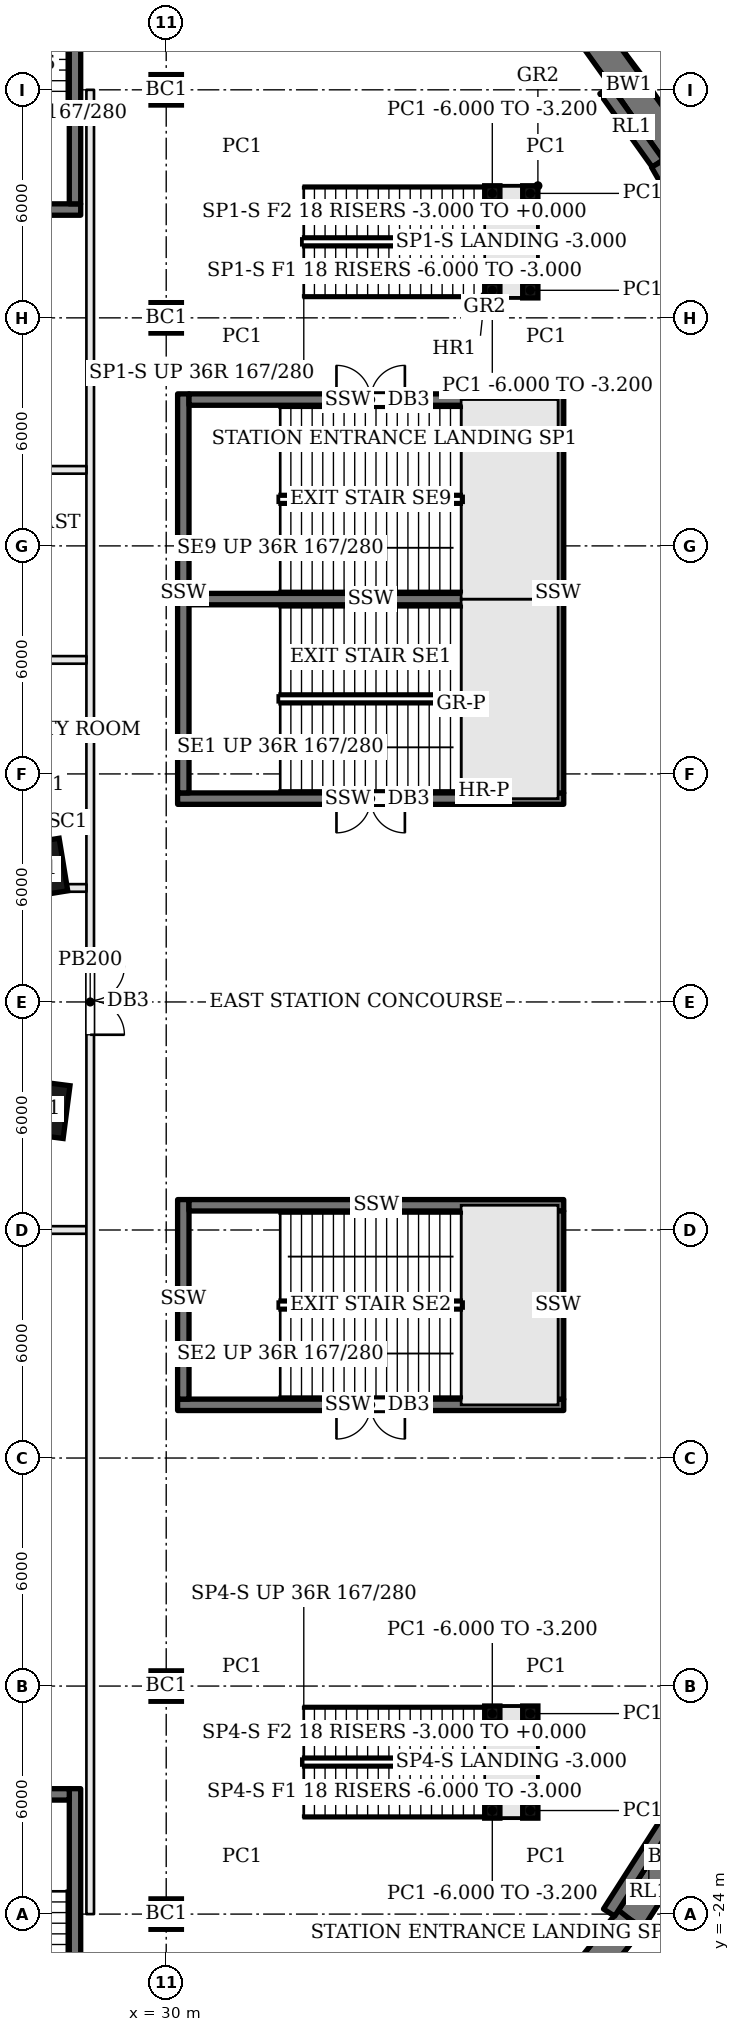
"""IFC4 building model, lengths in metres.
Left out: names, types, materials, properties, quantities, classifications, styles, units other than length and angle.
Written with IfcOpenShell. Run it as: python <this file> out.ifc"""

import sys

from ifc_helpers import new_model, si_unit, direction, frame, frame_2d, origin, origin_2d, place, context, subcontext, project, spatial, rectangle, extrude, element, fill, save


model = new_model("IFC4")
c1 = context("Model", 3, precision=1e-05, world=origin(), true_north=direction((0.0, 1.0)))
c2 = subcontext(c1, "Body", "Model", "MODEL_VIEW")
j1 = project(units=[si_unit("LENGTHUNIT", "METRE"), si_unit("PLANEANGLEUNIT", "RADIAN")], contexts=[c1])
p1 = place(None, origin())
s1 = spatial("IfcSite", under=j1, at=p1, CompositionType="ELEMENT")
p2 = place(p1, origin())
s2 = spatial("IfcBuilding", under=s1, at=p2, CompositionType="ELEMENT")
p3 = place(p2, frame((0.0, 0.0, -6.0)))
s3 = spatial("IfcBuildingStorey", under=s2, at=p3, CompositionType="ELEMENT", Elevation=-6.0)
p4 = place(p3, frame((44.339, -20.827, 0.0), z_axis=(0.0, 0.0, 1.0), x_axis=(-0.538906036872, -0.842365884532, 0.0)))
e1 = element("IfcWall", 1, at=p4, inside=s3, PredefinedType="SOLIDWALL", context=c2, shape_type="SweptSolid", body=[
    extrude(rectangle(XDim=3.941, YDim=0.8, at=frame_2d((1.971, 0.0))), origin(), (0.0, 0.0, 1.0), 5.65),
])
p5 = place(p3, frame((42.215, -24.147, 0.0), z_axis=(0.0, 0.0, 1.0), x_axis=(-0.622154611961, -0.782894398252, 0.0)))
e2 = element("IfcWall", 2, at=p5, inside=s3, PredefinedType="SOLIDWALL", context=c2, shape_type="SweptSolid", body=[
    extrude(rectangle(XDim=3.943, YDim=0.8, at=frame_2d((1.971, 0.0))), origin(), (0.0, 0.0, 1.0), 5.65),
])
p6 = place(p3, frame((41.028, 25.722, 0.0), z_axis=(0.0, 0.0, 1.0), x_axis=(0.581331910966, -0.813666522166, 0.0)))
e3 = element("IfcWall", 3, at=p6, inside=s3, PredefinedType="SOLIDWALL", context=c2, shape_type="SweptSolid", body=[
    extrude(rectangle(XDim=3.943, YDim=0.8, at=frame_2d((1.971, 0.0))), origin(), (0.0, 0.0, 1.0), 5.65),
])
p7 = place(p3, frame((43.32, 22.514, 0.0), z_axis=(0.0, 0.0, 1.0), x_axis=(0.494650889592, -0.869091765825, 0.0)))
e4 = element("IfcWall", 4, at=p7, inside=s3, PredefinedType="SOLIDWALL", context=c2, shape_type="SweptSolid", body=[
    extrude(rectangle(XDim=3.942, YDim=0.8, at=frame_2d((1.971, 0.0))), origin(), (0.0, 0.0, 1.0), 5.65),
])
for number, where, z_axis, x_axis in (
    (5, (30.0, -24.0, 0.0), (0.0, 0.0, 1.0), (1.0, 0.0, 0.0)),
    (6, (30.0, -18.0, 0.0), (0.0, 0.0, 1.0), (1.0, 0.0, 0.0)),
    (7, (30.0, 18.0, 0.0), (0.0, 0.0, 1.0), (1.0, 0.0, 0.0)),
    (8, (30.0, 24.0, 0.0), (0.0, 0.0, 1.0), (1.0, 0.0, 0.0)),
):
    element("IfcColumn", number, at=place(p3, frame(where, z_axis=z_axis, x_axis=x_axis)), inside=s3, PredefinedType="COLUMN", context=c2, shape_type="SweptSolid", body=[
        extrude(rectangle(XDim=0.8, YDim=0.8, at=origin_2d()), origin(), (0.0, 0.0, 1.0), 6.0),
    ])
for number, where, z_axis, x_axis in (
    (9, (26.605, 3.503, 0.0), (0.0, 0.0, 1.0), (-0.161, 0.987, 0.0)),
    (10, (26.684, -2.808, 0.0), (0.0, 0.0, 1.0), (0.128, 0.992, 0.0)),
):
    element("IfcColumn", number, at=place(p3, frame(where, z_axis=z_axis, x_axis=x_axis)), inside=s3, PredefinedType="COLUMN", context=c2, shape_type="SweptSolid", body=[
        extrude(rectangle(XDim=1.4, YDim=1.4, at=origin_2d()), origin(), (0.0, 0.0, 1.0), 6.0),
    ])
for number, where, z_axis, x_axis in (
    (11, (32.0, 17.5, 0.0), (0.0, 0.0, 1.0), (1.0, 0.0, 0.0)),
    (12, (40.0, 17.5, 0.0), (0.0, 0.0, 1.0), (1.0, 0.0, 0.0)),
    (13, (40.0, 22.5, 0.0), (0.0, 0.0, 1.0), (1.0, 0.0, 0.0)),
    (14, (32.0, 22.5, 0.0), (0.0, 0.0, 1.0), (1.0, 0.0, 0.0)),
):
    element("IfcColumn", number, at=place(p3, frame(where, z_axis=z_axis, x_axis=x_axis)), inside=s3, PredefinedType="COLUMN", context=c2, shape_type="SweptSolid", body=[
        extrude(rectangle(XDim=0.4, YDim=0.4, at=origin_2d()), origin(), (0.0, 0.0, 1.0), 6.0),
    ])
for number, where, z_axis, x_axis in (
    (15, (38.58, 18.725, 0.0), (0.0, 0.0, 1.0), (1.0, 0.0, 0.0)),
    (16, (39.58, 18.725, 0.0), (0.0, 0.0, 1.0), (1.0, 0.0, 0.0)),
    (17, (39.58, 21.275, 0.0), (0.0, 0.0, 1.0), (1.0, 0.0, 0.0)),
    (18, (38.58, 21.275, 0.0), (0.0, 0.0, 1.0), (1.0, 0.0, 0.0)),
):
    element("IfcColumn", number, at=place(p3, frame(where, z_axis=z_axis, x_axis=x_axis)), inside=s3, PredefinedType="COLUMN", context=c2, shape_type="SweptSolid", body=[
        extrude(rectangle(XDim=0.4, YDim=0.4, at=origin_2d()), origin(), (0.0, 0.0, 1.0), 2.8),
    ])
for number, where, z_axis, x_axis in (
    (19, (32.0, -22.5, 0.0), (0.0, 0.0, 1.0), (1.0, 0.0, 0.0)),
    (20, (40.0, -22.5, 0.0), (0.0, 0.0, 1.0), (1.0, 0.0, 0.0)),
    (21, (40.0, -17.5, 0.0), (0.0, 0.0, 1.0), (1.0, 0.0, 0.0)),
    (22, (32.0, -17.5, 0.0), (0.0, 0.0, 1.0), (1.0, 0.0, 0.0)),
):
    element("IfcColumn", number, at=place(p3, frame(where, z_axis=z_axis, x_axis=x_axis)), inside=s3, PredefinedType="COLUMN", context=c2, shape_type="SweptSolid", body=[
        extrude(rectangle(XDim=0.4, YDim=0.4, at=origin_2d()), origin(), (0.0, 0.0, 1.0), 6.0),
    ])
for number, where, z_axis, x_axis in (
    (23, (38.58, -21.275, 0.0), (0.0, 0.0, 1.0), (1.0, 0.0, 0.0)),
    (24, (39.58, -21.275, 0.0), (0.0, 0.0, 1.0), (1.0, 0.0, 0.0)),
    (25, (39.58, -18.725, 0.0), (0.0, 0.0, 1.0), (1.0, 0.0, 0.0)),
    (26, (38.58, -18.725, 0.0), (0.0, 0.0, 1.0), (1.0, 0.0, 0.0)),
):
    element("IfcColumn", number, at=place(p3, frame(where, z_axis=z_axis, x_axis=x_axis)), inside=s3, PredefinedType="COLUMN", context=c2, shape_type="SweptSolid", body=[
        extrude(rectangle(XDim=0.4, YDim=0.4, at=origin_2d()), origin(), (0.0, 0.0, 1.0), 2.8),
    ])
p8 = place(p3, frame((-27.9, -6.0, 0.0), z_axis=(0.0, 0.0, 1.0), x_axis=(1.0, 0.0, 0.0)))
e27 = element("IfcWall", 27, at=p8, inside=s3, PredefinedType="PARTITIONING", context=c2, shape_type="SweptSolid", body=[
    extrude(rectangle(XDim=55.8, YDim=0.2, at=frame_2d((27.9, 0.0))), origin(), (0.0, 0.0, 1.0), 5.148),
])
p9 = place(p8, frame((0.5, 0.0, 0.0)))
e28 = element("IfcOpeningElement", 28, at=p9, cuts=e27, PredefinedType="OPENING", context=c2, shape_type="SweptSolid", body=[
    extrude(rectangle(XDim=1.2, YDim=2.1, at=frame_2d((0.6, 1.05))), frame((0.0, 0.11, 0.0), z_axis=(0.0, -1.0, 0.0), x_axis=(1.0, 0.0, 0.0)), (0.0, 0.0, 1.0), 0.22),
])
p10 = place(p8, frame((1.94, 0.0, 0.0)))
e29 = element("IfcOpeningElement", 29, at=p10, cuts=e27, PredefinedType="OPENING", context=c2, shape_type="SweptSolid", body=[
    extrude(rectangle(XDim=1.2, YDim=2.1, at=frame_2d((0.6, 1.05))), frame((0.0, 0.11, 0.0), z_axis=(0.0, -1.0, 0.0), x_axis=(1.0, 0.0, 0.0)), (0.0, 0.0, 1.0), 0.22),
])
p11 = place(p8, frame((3.38, 0.0, 0.0)))
e30 = element("IfcOpeningElement", 30, at=p11, cuts=e27, PredefinedType="OPENING", context=c2, shape_type="SweptSolid", body=[
    extrude(rectangle(XDim=1.2, YDim=2.1, at=frame_2d((0.6, 1.05))), frame((0.0, 0.11, 0.0), z_axis=(0.0, -1.0, 0.0), x_axis=(1.0, 0.0, 0.0)), (0.0, 0.0, 1.0), 0.22),
])
p12 = place(p8, frame((4.82, 0.0, 0.0)))
e31 = element("IfcOpeningElement", 31, at=p12, cuts=e27, PredefinedType="OPENING", context=c2, shape_type="SweptSolid", body=[
    extrude(rectangle(XDim=1.2, YDim=2.1, at=frame_2d((0.6, 1.05))), frame((0.0, 0.11, 0.0), z_axis=(0.0, -1.0, 0.0), x_axis=(1.0, 0.0, 0.0)), (0.0, 0.0, 1.0), 0.22),
])
p13 = place(p8, frame((6.5, 0.0, 0.0)))
e32 = element("IfcOpeningElement", 32, at=p13, cuts=e27, PredefinedType="OPENING", context=c2, shape_type="SweptSolid", body=[
    extrude(rectangle(XDim=1.2, YDim=2.1, at=frame_2d((0.6, 1.05))), frame((0.0, 0.11, 0.0), z_axis=(0.0, -1.0, 0.0), x_axis=(1.0, 0.0, 0.0)), (0.0, 0.0, 1.0), 0.22),
])
p14 = place(p8, frame((7.94, 0.0, 0.0)))
e33 = element("IfcOpeningElement", 33, at=p14, cuts=e27, PredefinedType="OPENING", context=c2, shape_type="SweptSolid", body=[
    extrude(rectangle(XDim=1.2, YDim=2.1, at=frame_2d((0.6, 1.05))), frame((0.0, 0.11, 0.0), z_axis=(0.0, -1.0, 0.0), x_axis=(1.0, 0.0, 0.0)), (0.0, 0.0, 1.0), 0.22),
])
p15 = place(p8, frame((9.32, 0.0, 0.0)))
e34 = element("IfcOpeningElement", 34, at=p15, cuts=e27, PredefinedType="OPENING", context=c2, shape_type="SweptSolid", body=[
    extrude(rectangle(XDim=1.8, YDim=2.1, at=frame_2d((0.9, 1.05))), frame((0.0, 0.11, 0.0), z_axis=(0.0, -1.0, 0.0), x_axis=(1.0, 0.0, 0.0)), (0.0, 0.0, 1.0), 0.22),
])
p16 = place(p3, frame((28.0, 24.0, 0.0), z_axis=(0.0, 0.0, 1.0), x_axis=(0.0, -1.0, 0.0)))
e35 = element("IfcWall", 35, at=p16, inside=s3, PredefinedType="PARTITIONING", context=c2, shape_type="SweptSolid", body=[
    extrude(rectangle(XDim=48.0, YDim=0.2, at=frame_2d((24.0, 0.0))), origin(), (0.0, 0.0, 1.0), 5.148),
])
p17 = place(p16, frame((23.063, 0.0, 0.0)))
e36 = element("IfcOpeningElement", 36, at=p17, cuts=e35, PredefinedType="OPENING", context=c2, shape_type="SweptSolid", body=[
    extrude(rectangle(XDim=1.8, YDim=2.1, at=frame_2d((0.9, 1.05))), frame((0.0, 0.11, 0.0), z_axis=(0.0, -1.0, 0.0), x_axis=(1.0, 0.0, 0.0)), (0.0, 0.0, 1.0), 0.22),
])
p18 = place(p3, frame((27.6, -30.86, 0.0), z_axis=(0.0, 0.0, 1.0), x_axis=(0.0, 1.0, 0.0)))
e37 = element("IfcWall", 37, at=p18, inside=s3, PredefinedType="SOLIDWALL", context=c2, shape_type="SweptSolid", body=[
    extrude(rectangle(XDim=10.16, YDim=0.3, at=frame_2d((5.08, 0.0))), origin(), (0.0, 0.0, 1.0), 5.65),
])
p19 = place(p3, frame((27.45, -20.85, 0.0), z_axis=(0.0, 0.0, 1.0), x_axis=(-1.0, 0.0, 0.0)))
e38 = element("IfcWall", 38, at=p19, inside=s3, PredefinedType="SOLIDWALL", context=c2, shape_type="SweptSolid", body=[
    extrude(rectangle(XDim=5.25, YDim=0.3, at=frame_2d((2.625, 0.0))), origin(), (0.0, 0.0, 1.0), 5.65),
])
p20 = place(p3, frame((27.9, 14.0, 0.0), z_axis=(0.0, 0.0, 1.0), x_axis=(-1.0, 0.0, 0.0)))
e39 = element("IfcWall", 39, at=p20, inside=s3, PredefinedType="PARTITIONING", context=c2, shape_type="SweptSolid", body=[
    extrude(rectangle(XDim=10.0, YDim=0.2, at=frame_2d((5.0, 0.0))), origin(), (0.0, 0.0, 1.0), 5.134),
])
p21 = place(p3, frame((21.1, 9.0, 0.0), z_axis=(0.0, 0.0, 1.0), x_axis=(1.0, 0.0, 0.0)))
e40 = element("IfcWall", 40, at=p21, inside=s3, PredefinedType="PARTITIONING", context=c2, shape_type="SweptSolid", body=[
    extrude(rectangle(XDim=6.8, YDim=0.2, at=frame_2d((3.4, 0.0))), origin(), (0.0, 0.0, 1.0), 5.134),
])
p22 = place(p3, frame((22.5, 20.85, 0.0), z_axis=(0.0, 0.0, 1.0), x_axis=(1.0, 0.0, 0.0)))
e41 = element("IfcWall", 41, at=p22, inside=s3, PredefinedType="SOLIDWALL", context=c2, shape_type="SweptSolid", body=[
    extrude(rectangle(XDim=5.25, YDim=0.3, at=frame_2d((2.625, 0.0))), origin(), (0.0, 0.0, 1.0), 5.65),
])
p23 = place(p3, frame((27.6, 21.0, 0.0), z_axis=(0.0, 0.0, 1.0), x_axis=(0.0, 1.0, 0.0)))
e42 = element("IfcWall", 42, at=p23, inside=s3, PredefinedType="SOLIDWALL", context=c2, shape_type="SweptSolid", body=[
    extrude(rectangle(XDim=9.86, YDim=0.3, at=frame_2d((4.93, 0.0))), origin(), (0.0, 0.0, 1.0), 5.65),
])
p24 = place(p3, frame((21.1, 3.0, 0.0), z_axis=(0.0, 0.0, 1.0), x_axis=(1.0, 0.0, 0.0)))
e43 = element("IfcWall", 43, at=p24, inside=s3, PredefinedType="PARTITIONING", context=c2, shape_type="SweptSolid", body=[
    extrude(rectangle(XDim=6.8, YDim=0.2, at=frame_2d((3.4, 0.0))), origin(), (0.0, 0.0, 1.0), 5.148),
])
p25 = place(p24, frame((0.7, 0.0, 0.0)))
e44 = element("IfcOpeningElement", 44, at=p25, cuts=e43, PredefinedType="OPENING", context=c2, shape_type="SweptSolid", body=[
    extrude(rectangle(XDim=1.0, YDim=2.1, at=frame_2d((0.5, 1.05))), frame((0.0, 0.11, 0.0), z_axis=(0.0, -1.0, 0.0), x_axis=(1.0, 0.0, 0.0)), (0.0, 0.0, 1.0), 0.22),
])
p26 = place(p24, frame((2.483, 0.0, 0.0)))
e45 = element("IfcOpeningElement", 45, at=p26, cuts=e43, PredefinedType="OPENING", context=c2, shape_type="SweptSolid", body=[
    extrude(rectangle(XDim=1.0, YDim=2.1, at=frame_2d((0.5, 1.05))), frame((0.0, 0.11, 0.0), z_axis=(0.0, -1.0, 0.0), x_axis=(1.0, 0.0, 0.0)), (0.0, 0.0, 1.0), 0.22),
])
p27 = place(p3, frame((40.46, 5.35, 0.0), z_axis=(0.0, 0.0, 1.0), x_axis=(-1.0, 0.0, 0.0)))
e46 = element("IfcWall", 46, at=p27, inside=s3, PredefinedType="SOLIDWALL", context=c2, shape_type="SweptSolid", body=[
    extrude(rectangle(XDim=10.16, YDim=0.3, at=frame_2d((5.08, 0.0))), origin(), (0.0, 0.0, 1.0), 5.65),
])
p28 = place(p27, frame((4.18, 0.0, 0.0)))
e47 = element("IfcOpeningElement", 47, at=p28, cuts=e46, PredefinedType="OPENING", context=c2, shape_type="SweptSolid", body=[
    extrude(rectangle(XDim=1.8, YDim=2.1, at=frame_2d((0.9, 1.05))), frame((0.0, 0.16, 0.0), z_axis=(0.0, -1.0, 0.0), x_axis=(1.0, 0.0, 0.0)), (0.0, 0.0, 1.0), 0.32),
])
p29 = place(p3, frame((30.45, 5.5, 0.0), z_axis=(0.0, 0.0, 1.0), x_axis=(0.0, 1.0, 0.0)))
e48 = element("IfcWall", 48, at=p29, inside=s3, PredefinedType="SOLIDWALL", context=c2, shape_type="SweptSolid", body=[
    extrude(rectangle(XDim=10.5, YDim=0.3, at=frame_2d((5.25, 0.0))), origin(), (0.0, 0.0, 1.0), 5.65),
])
p30 = place(p3, frame((30.6, 10.6, 0.0), z_axis=(0.0, 0.0, 1.0), x_axis=(1.0, 0.0, 0.0)))
e49 = element("IfcWall", 49, at=p30, inside=s3, PredefinedType="SOLIDWALL", context=c2, shape_type="SweptSolid", body=[
    extrude(rectangle(XDim=9.56, YDim=0.3, at=frame_2d((4.78, 0.0))), origin(), (0.0, 0.0, 1.0), 5.65),
])
p31 = place(p3, frame((40.31, 16.0, 0.0), z_axis=(0.0, 0.0, 1.0), x_axis=(0.0, -1.0, 0.0)))
e50 = element("IfcWall", 50, at=p31, inside=s3, PredefinedType="SOLIDWALL", context=c2, shape_type="SweptSolid", body=[
    extrude(rectangle(XDim=10.5, YDim=0.3, at=frame_2d((5.25, 0.0))), origin(), (0.0, 0.0, 1.0), 5.65),
])
p32 = place(p3, frame((40.46, -10.6, 0.0), z_axis=(0.0, 0.0, 1.0), x_axis=(-1.0, 0.0, 0.0)))
e51 = element("IfcWall", 51, at=p32, inside=s3, PredefinedType="SOLIDWALL", context=c2, shape_type="SweptSolid", body=[
    extrude(rectangle(XDim=10.16, YDim=0.3, at=frame_2d((5.08, 0.0))), origin(), (0.0, 0.0, 1.0), 5.65),
])
p33 = place(p32, frame((4.18, 0.0, 0.0)))
e52 = element("IfcOpeningElement", 52, at=p33, cuts=e51, PredefinedType="OPENING", context=c2, shape_type="SweptSolid", body=[
    extrude(rectangle(XDim=1.8, YDim=2.1, at=frame_2d((0.9, 1.05))), frame((0.0, 0.16, 0.0), z_axis=(0.0, -1.0, 0.0), x_axis=(1.0, 0.0, 0.0)), (0.0, 0.0, 1.0), 0.32),
])
p34 = place(p3, frame((30.45, -10.45, 0.0), z_axis=(0.0, 0.0, 1.0), x_axis=(0.0, 1.0, 0.0)))
e53 = element("IfcWall", 53, at=p34, inside=s3, PredefinedType="SOLIDWALL", context=c2, shape_type="SweptSolid", body=[
    extrude(rectangle(XDim=5.25, YDim=0.3, at=frame_2d((2.625, 0.0))), origin(), (0.0, 0.0, 1.0), 5.65),
])
p35 = place(p3, frame((30.6, -5.35, 0.0), z_axis=(0.0, 0.0, 1.0), x_axis=(1.0, 0.0, 0.0)))
e54 = element("IfcWall", 54, at=p35, inside=s3, PredefinedType="SOLIDWALL", context=c2, shape_type="SweptSolid", body=[
    extrude(rectangle(XDim=9.86, YDim=0.3, at=frame_2d((4.93, 0.0))), origin(), (0.0, 0.0, 1.0), 5.65),
])
p36 = place(p3, frame((40.31, -5.5, 0.0), z_axis=(0.0, 0.0, 1.0), x_axis=(0.0, -1.0, 0.0)))
e55 = element("IfcWall", 55, at=p36, inside=s3, PredefinedType="SOLIDWALL", context=c2, shape_type="SweptSolid", body=[
    extrude(rectangle(XDim=4.95, YDim=0.3, at=frame_2d((2.475, 0.0))), origin(), (0.0, 0.0, 1.0), 5.65),
])
p37 = place(p3, frame((30.6, 15.85, 0.0), z_axis=(0.0, 0.0, 1.0), x_axis=(1.0, 0.0, 0.0)))
e56 = element("IfcWall", 56, at=p37, inside=s3, PredefinedType="SOLIDWALL", context=c2, shape_type="SweptSolid", body=[
    extrude(rectangle(XDim=9.56, YDim=0.3, at=frame_2d((4.78, 0.0))), origin(), (0.0, 0.0, 1.0), 5.65),
])
p38 = place(p37, frame((3.88, 0.0, 0.0)))
e57 = element("IfcOpeningElement", 57, at=p38, cuts=e56, PredefinedType="OPENING", context=c2, shape_type="SweptSolid", body=[
    extrude(rectangle(XDim=1.8, YDim=2.1, at=frame_2d((0.9, 1.05))), frame((0.0, 0.16, 0.0), z_axis=(0.0, -1.0, 0.0), x_axis=(1.0, 0.0, 0.0)), (0.0, 0.0, 1.0), 0.32),
])
p39 = place(p3, frame((43.745, -20.689, 0.0), z_axis=(0.0, 0.0, 1.0), x_axis=(-0.538798521209, -0.842434658322, 0.0)))
e58 = element("IfcWall", 58, at=p39, inside=s3, PredefinedType="SOLIDWALL", context=c2, shape_type="SweptSolid", body=[
    extrude(rectangle(XDim=3.883, YDim=0.35, at=frame_2d((1.941, 0.0))), origin(), (0.0, 0.0, 1.0), 5.65),
])
p40 = place(p3, frame((41.552, 24.0, 0.0), z_axis=(0.0, 0.0, 1.0), x_axis=(0.581170308651, -0.813781956265, 0.0)))
e59 = element("IfcWall", 59, at=p40, inside=s3, PredefinedType="SOLIDWALL", context=c2, shape_type="SweptSolid", body=[
    extrude(rectangle(XDim=2.381, YDim=0.35, at=frame_2d((1.191, 0.0))), origin(), (0.0, 0.0, 1.0), 5.65),
])
p41 = place(p3, frame((42.921, 22.052, 0.0), z_axis=(0.0, 0.0, 1.0), x_axis=(0.494886084707, -0.868957860407, 0.0)))
e60 = element("IfcWall", 60, at=p41, inside=s3, PredefinedType="SOLIDWALL", context=c2, shape_type="SweptSolid", body=[
    extrude(rectangle(XDim=3.884, YDim=0.35, at=frame_2d((1.942, 0.0))), origin(), (0.0, 0.0, 1.0), 5.65),
])
p42 = place(p28, origin())
e61 = element("IfcDoor", 61, at=p42, inside=s3, OperationType="DOUBLE_DOOR_SINGLE_SWING", PredefinedType="DOOR", context=c2, shape_type="SweptSolid", body=[
    extrude(rectangle(XDim=1.8, YDim=2.1, at=frame_2d((0.9, 1.05))), frame((0.0, 0.025, 0.0), z_axis=(0.0, -1.0, 0.0), x_axis=(1.0, 0.0, 0.0)), (0.0, 0.0, 1.0), 0.05),
])
fill(e47, e61)
p43 = place(p33, origin())
e62 = element("IfcDoor", 62, at=p43, inside=s3, OperationType="DOUBLE_DOOR_SINGLE_SWING", PredefinedType="DOOR", context=c2, shape_type="SweptSolid", body=[
    extrude(rectangle(XDim=1.8, YDim=2.1, at=frame_2d((0.9, 1.05))), frame((0.0, 0.025, 0.0), z_axis=(0.0, -1.0, 0.0), x_axis=(1.0, 0.0, 0.0)), (0.0, 0.0, 1.0), 0.05),
])
fill(e52, e62)
p44 = place(p38, origin())
e63 = element("IfcDoor", 63, at=p44, inside=s3, OperationType="DOUBLE_DOOR_SINGLE_SWING", PredefinedType="DOOR", context=c2, shape_type="SweptSolid", body=[
    extrude(rectangle(XDim=1.8, YDim=2.1, at=frame_2d((0.9, 1.05))), frame((0.0, 0.025, 0.0), z_axis=(0.0, -1.0, 0.0), x_axis=(1.0, 0.0, 0.0)), (0.0, 0.0, 1.0), 0.05),
])
fill(e57, e63)
p45 = place(p17, origin())
e64 = element("IfcDoor", 64, at=p45, inside=s3, OperationType="DOUBLE_DOOR_SINGLE_SWING", PredefinedType="DOOR", context=c2, shape_type="SweptSolid", body=[
    extrude(rectangle(XDim=1.8, YDim=2.1, at=frame_2d((0.9, 1.05))), frame((0.0, 0.025, 0.0), z_axis=(0.0, -1.0, 0.0), x_axis=(1.0, 0.0, 0.0)), (0.0, 0.0, 1.0), 0.05),
])
fill(e36, e64)
save(model, sys.argv[1])
